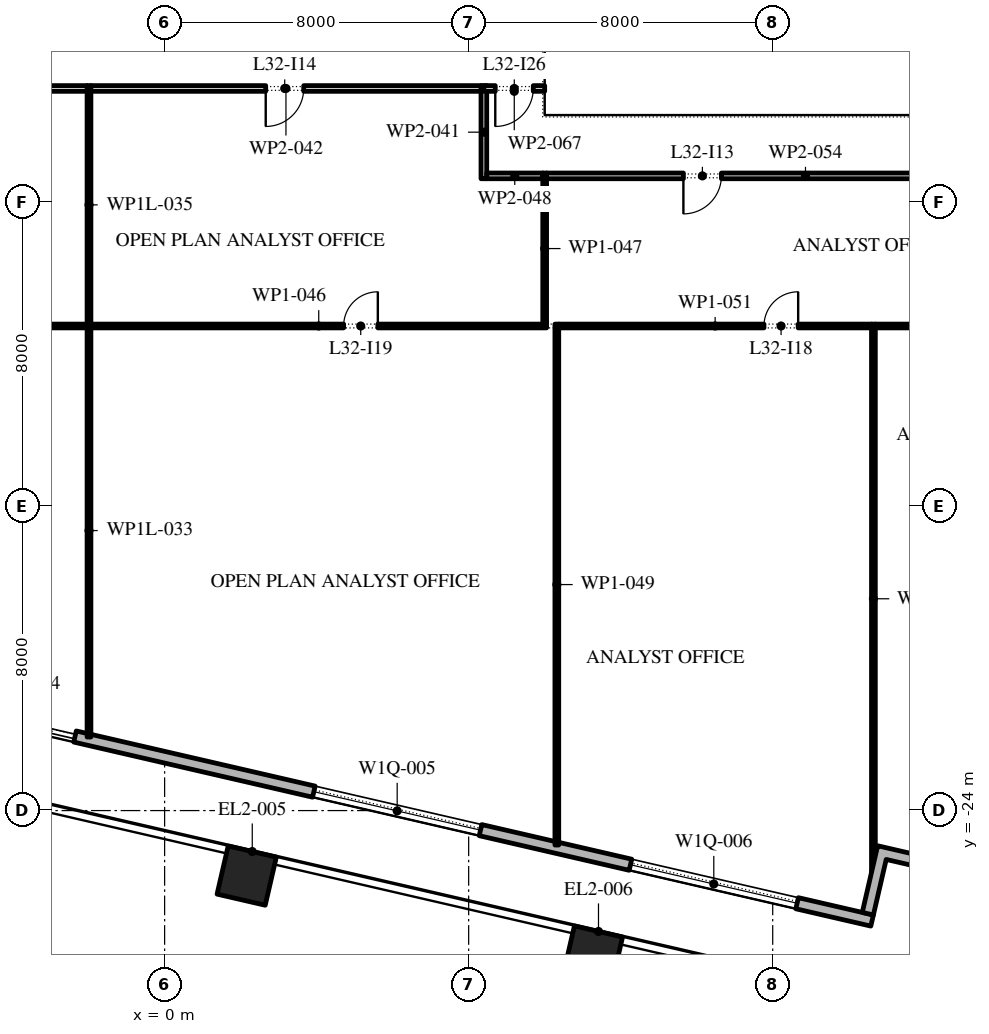
"""IFC4 building model, lengths in metres.
Left out: names, types, materials, properties, quantities, classifications, styles, units other than length and angle.
Written with IfcOpenShell. Run it as: python <this file> out.ifc"""

import sys

from ifc_helpers import new_model, si_unit, direction, frame, frame_2d, origin, origin_2d, place, context, subcontext, project, spatial, polyline, rectangle, outline, extrude, element, fill, save


model = new_model("IFC4")
c1 = context("Model", 3, precision=1e-05, world=origin(), true_north=direction((0.0, 1.0)))
c2 = subcontext(c1, "Body", "Model", "MODEL_VIEW")
j1 = project(units=[si_unit("LENGTHUNIT", "METRE"), si_unit("PLANEANGLEUNIT", "RADIAN")], contexts=[c1])
p1 = place(None, origin())
s1 = spatial("IfcSite", under=j1, at=p1, CompositionType="ELEMENT")
p2 = place(p1, origin())
s2 = spatial("IfcBuilding", under=s1, at=p2, CompositionType="ELEMENT")
p3 = place(p2, frame((0.0, 0.0, 147.6)))
s3 = spatial("IfcBuildingStorey", under=s2, at=p3, CompositionType="ELEMENT", Elevation=147.6)
for number, where, z_axis, x_axis in (
    (1, (2.159, -25.711, 0.0), (0.0, 0.0, 1.0), (0.974, -0.225, 0.0)),
    (2, (11.27, -27.815, 0.0), (0.0, 0.0, 1.0), (0.974, -0.225, 0.0)),
):
    element("IfcColumn", number, at=place(p3, frame(where, z_axis=z_axis, x_axis=x_axis)), inside=s3, PredefinedType="COLUMN", context=c2, shape_type="SweptSolid", body=[
        extrude(rectangle(XDim=1.3, YDim=1.3, at=origin_2d()), origin(), (0.0, 0.0, 1.0), 4.2),
    ])
p4 = place(p3, frame((-31.078, -15.421, 0.0), z_axis=(0.0, 0.0, 1.0), x_axis=(0.974370456532, -0.224949357493, 0.0)))
e3 = element("IfcWall", 3, at=p4, inside=s3, PredefinedType="STANDARD", context=c2, shape_type="SweptSolid", body=[
    extrude(rectangle(XDim=51.0, YDim=0.3, at=frame_2d((25.5, 0.0))), origin(), (0.0, 0.0, 1.0), 4.0),
])
p5 = place(p4, frame((1.875, 0.0, 0.45)))
e4 = element("IfcOpeningElement", 4, at=p5, cuts=e3, PredefinedType="OPENING", context=c2, shape_type="SweptSolid", body=[
    extrude(rectangle(XDim=4.5, YDim=2.65, at=frame_2d((2.25, 1.325))), frame((0.0, 0.16, 0.0), z_axis=(0.0, -1.0, 0.0), x_axis=(1.0, 0.0, 0.0)), (0.0, 0.0, 1.0), 0.32),
])
p6 = place(p4, frame((10.275, 0.0, 0.45)))
e5 = element("IfcOpeningElement", 5, at=p6, cuts=e3, PredefinedType="OPENING", context=c2, shape_type="SweptSolid", body=[
    extrude(rectangle(XDim=4.5, YDim=2.525, at=frame_2d((2.25, 1.262))), frame((0.0, 0.16, 0.0), z_axis=(0.0, -1.0, 0.0), x_axis=(1.0, 0.0, 0.0)), (0.0, 0.0, 1.0), 0.32),
])
p7 = place(p4, frame((18.825, 0.0, 0.45)))
e6 = element("IfcOpeningElement", 6, at=p7, cuts=e3, PredefinedType="OPENING", context=c2, shape_type="SweptSolid", body=[
    extrude(rectangle(XDim=4.5, YDim=2.5, at=frame_2d((2.25, 1.25))), frame((0.0, 0.16, 0.0), z_axis=(0.0, -1.0, 0.0), x_axis=(1.0, 0.0, 0.0)), (0.0, 0.0, 1.0), 0.32),
])
p8 = place(p4, frame((27.075, 0.0, 0.0)))
e7 = element("IfcOpeningElement", 7, at=p8, cuts=e3, PredefinedType="OPENING", context=c2, shape_type="SweptSolid", body=[
    extrude(rectangle(XDim=2.4, YDim=3.5, at=frame_2d((1.2, 1.75))), frame((0.0, 0.16, 0.0), z_axis=(0.0, -1.0, 0.0), x_axis=(1.0, 0.0, 0.0)), (0.0, 0.0, 1.0), 0.32),
])
p9 = place(p4, frame((35.925, 0.0, 0.45)))
e8 = element("IfcOpeningElement", 8, at=p9, cuts=e3, PredefinedType="OPENING", context=c2, shape_type="SweptSolid", body=[
    extrude(rectangle(XDim=4.5, YDim=2.45, at=frame_2d((2.25, 1.225))), frame((0.0, 0.16, 0.0), z_axis=(0.0, -1.0, 0.0), x_axis=(1.0, 0.0, 0.0)), (0.0, 0.0, 1.0), 0.32),
])
p10 = place(p4, frame((44.475, 0.0, 0.45)))
e9 = element("IfcOpeningElement", 9, at=p10, cuts=e3, PredefinedType="OPENING", context=c2, shape_type="SweptSolid", body=[
    extrude(rectangle(XDim=4.5, YDim=2.45, at=frame_2d((2.25, 1.225))), frame((0.0, 0.16, 0.0), z_axis=(0.0, -1.0, 0.0), x_axis=(1.0, 0.0, 0.0)), (0.0, 0.0, 1.0), 0.32),
])
p11 = place(p3, origin())
e10 = element("IfcWall", 10, at=p11, inside=s3, PredefinedType="STANDARD", context=c2, shape_type="SweptSolid", body=[
    extrude(outline(polyline([(20.515, -25.331), (20.92, -23.577), (22.967, -24.049), (22.899, -24.342), (21.145, -23.937), (20.74, -25.691), (18.986, -25.286), (18.649, -26.747), (18.357, -26.68), (18.762, -24.926), (20.515, -25.331)])), origin(), (0.0, 0.0, 1.0), 4.0),
])
p12 = place(p3, frame((-1.99, -22.065, 0.0), z_axis=(0.0, 0.0, 1.0), x_axis=(0.0, 1.0, 0.0)))
e11 = element("IfcWall", 11, at=p12, inside=s3, PredefinedType="PARTITIONING", context=c2, shape_type="SweptSolid", body=[
    extrude(rectangle(XDim=10.865, YDim=0.1, at=frame_2d((5.433, 0.0))), origin(), (0.0, 0.0, 1.0), 3.02),
])
p13 = place(p3, frame((-2.04, -11.25, 0.0), z_axis=(0.0, 0.0, 1.0), x_axis=(-1.0, 0.0, 0.0)))
e12 = element("IfcWall", 12, at=p13, inside=s3, PredefinedType="PARTITIONING", context=c2, shape_type="SweptSolid", body=[
    extrude(rectangle(XDim=8.23, YDim=0.1, at=frame_2d((4.115, 0.0))), origin(), (0.0, 0.0, 1.0), 4.0),
])
p14 = place(p13, frame((5.43, 0.0, 0.0)))
e13 = element("IfcOpeningElement", 13, at=p14, cuts=e12, PredefinedType="OPENING", context=c2, shape_type="SweptSolid", body=[
    extrude(rectangle(XDim=0.9, YDim=2.1, at=frame_2d((0.45, 1.05))), frame((0.0, 0.06, 0.0), z_axis=(0.0, -1.0, 0.0), x_axis=(1.0, 0.0, 0.0)), (0.0, 0.0, 1.0), 0.12),
])
p15 = place(p3, frame((-1.99, -11.2, 0.0), z_axis=(0.0, 0.0, 1.0), x_axis=(0.0, 1.0, 0.0)))
e14 = element("IfcWall", 14, at=p15, inside=s3, PredefinedType="PARTITIONING", context=c2, shape_type="SweptSolid", body=[
    extrude(rectangle(XDim=6.275, YDim=0.1, at=frame_2d((3.137, 0.0))), origin(), (0.0, 0.0, 1.0), 3.02),
])
p16 = place(p3, frame((-2.04, -5.0, 0.0), z_axis=(0.0, 0.0, 1.0), x_axis=(-1.0, 0.0, 0.0)))
e15 = element("IfcWall", 15, at=p16, inside=s3, PredefinedType="PARTITIONING", context=c2, shape_type="SweptSolid", body=[
    extrude(rectangle(XDim=6.285, YDim=0.15, at=frame_2d((3.143, 0.0))), origin(), (0.0, 0.0, 1.0), 4.0),
])
p17 = place(p3, frame((8.4, -7.375, 0.0), z_axis=(0.0, 0.0, 1.0), x_axis=(0.0, 1.0, 0.0)))
e16 = element("IfcWall", 16, at=p17, inside=s3, PredefinedType="PARTITIONING", context=c2, shape_type="SweptSolid", body=[
    extrude(rectangle(XDim=2.45, YDim=0.15, at=frame_2d((1.225, 0.0))), origin(), (0.0, 0.0, 1.0), 4.0),
])
p18 = place(p3, frame((8.325, -5.0, 0.0), z_axis=(0.0, 0.0, 1.0), x_axis=(-1.0, 0.0, 0.0)))
e17 = element("IfcWall", 17, at=p18, inside=s3, PredefinedType="PARTITIONING", context=c2, shape_type="SweptSolid", body=[
    extrude(rectangle(XDim=10.265, YDim=0.15, at=frame_2d((5.132, 0.0))), origin(), (0.0, 0.0, 1.0), 4.0),
])
p19 = place(p18, frame((4.665, 0.0, 0.0)))
e18 = element("IfcOpeningElement", 18, at=p19, cuts=e17, PredefinedType="OPENING", context=c2, shape_type="SweptSolid", body=[
    extrude(rectangle(XDim=1.0, YDim=2.1, at=frame_2d((0.5, 1.05))), frame((0.0, 0.085, 0.0), z_axis=(0.0, -1.0, 0.0), x_axis=(1.0, 0.0, 0.0)), (0.0, 0.0, 1.0), 0.17),
])
p20 = place(p3, frame((10.05, -11.25, 0.0), z_axis=(0.0, 0.0, 1.0), x_axis=(-1.0, 0.0, 0.0)))
e19 = element("IfcWall", 19, at=p20, inside=s3, PredefinedType="PARTITIONING", context=c2, shape_type="SweptSolid", body=[
    extrude(rectangle(XDim=11.99, YDim=0.1, at=frame_2d((5.995, 0.0))), origin(), (0.0, 0.0, 1.0), 4.0),
])
p21 = place(p20, frame((4.44, 0.0, 0.0)))
e20 = element("IfcOpeningElement", 20, at=p21, cuts=e19, PredefinedType="OPENING", context=c2, shape_type="SweptSolid", body=[
    extrude(rectangle(XDim=0.9, YDim=2.1, at=frame_2d((0.45, 1.05))), frame((0.0, 0.06, 0.0), z_axis=(0.0, -1.0, 0.0), x_axis=(1.0, 0.0, 0.0)), (0.0, 0.0, 1.0), 0.12),
])
p22 = place(p3, frame((10.0, -11.2, 0.0), z_axis=(0.0, 0.0, 1.0), x_axis=(0.0, 1.0, 0.0)))
e21 = element("IfcWall", 21, at=p22, inside=s3, PredefinedType="PARTITIONING", context=c2, shape_type="SweptSolid", body=[
    extrude(rectangle(XDim=3.975, YDim=0.1, at=frame_2d((1.987, 0.0))), origin(), (0.0, 0.0, 1.0), 4.0),
])
p23 = place(p3, frame((9.95, -7.3, 0.0), z_axis=(0.0, 0.0, 1.0), x_axis=(-1.0, 0.0, 0.0)))
e22 = element("IfcWall", 22, at=p23, inside=s3, PredefinedType="PARTITIONING", context=c2, shape_type="SweptSolid", body=[
    extrude(rectangle(XDim=1.475, YDim=0.15, at=frame_2d((0.737, 0.0))), origin(), (0.0, 0.0, 1.0), 4.0),
])
p24 = place(p3, frame((10.32, -24.907, 0.0), z_axis=(0.0, 0.0, 1.0), x_axis=(0.0, 1.0, 0.0)))
e23 = element("IfcWall", 23, at=p24, inside=s3, PredefinedType="PARTITIONING", context=c2, shape_type="SweptSolid", body=[
    extrude(rectangle(XDim=13.707, YDim=0.1, at=frame_2d((6.854, 0.0))), origin(), (0.0, 0.0, 1.0), 4.0),
])
p25 = place(p3, frame((18.65, -25.654, 0.0), z_axis=(0.0, 0.0, 1.0), x_axis=(0.0, 1.0, 0.0)))
e24 = element("IfcWall", 24, at=p25, inside=s3, PredefinedType="PARTITIONING", context=c2, shape_type="SweptSolid", body=[
    extrude(rectangle(XDim=14.454, YDim=0.1, at=frame_2d((7.227, 0.0))), origin(), (0.0, 0.0, 1.0), 4.0),
])
p26 = place(p3, frame((18.6, -11.25, 0.0), z_axis=(0.0, 0.0, 1.0), x_axis=(-1.0, 0.0, 0.0)))
e25 = element("IfcWall", 25, at=p26, inside=s3, PredefinedType="PARTITIONING", context=c2, shape_type="SweptSolid", body=[
    extrude(rectangle(XDim=8.23, YDim=0.1, at=frame_2d((4.115, 0.0))), origin(), (0.0, 0.0, 1.0), 4.0),
])
p27 = place(p26, frame((1.93, 0.0, 0.0)))
e26 = element("IfcOpeningElement", 26, at=p27, cuts=e25, PredefinedType="OPENING", context=c2, shape_type="SweptSolid", body=[
    extrude(rectangle(XDim=0.9, YDim=2.1, at=frame_2d((0.45, 1.05))), frame((0.0, 0.06, 0.0), z_axis=(0.0, -1.0, 0.0), x_axis=(1.0, 0.0, 0.0)), (0.0, 0.0, 1.0), 0.12),
])
p28 = place(p3, frame((23.675, -7.3, 0.0), z_axis=(0.0, 0.0, 1.0), x_axis=(-1.0, 0.0, 0.0)))
e27 = element("IfcWall", 27, at=p28, inside=s3, PredefinedType="PARTITIONING", context=c2, shape_type="SweptSolid", body=[
    extrude(rectangle(XDim=13.625, YDim=0.15, at=frame_2d((6.812, 0.0))), origin(), (0.0, 0.0, 1.0), 4.0),
])
p29 = place(p28, frame((9.025, 0.0, 0.0)))
e28 = element("IfcOpeningElement", 28, at=p29, cuts=e27, PredefinedType="OPENING", context=c2, shape_type="SweptSolid", body=[
    extrude(rectangle(XDim=1.0, YDim=2.1, at=frame_2d((0.5, 1.05))), frame((0.0, 0.085, 0.0), z_axis=(0.0, -1.0, 0.0), x_axis=(1.0, 0.0, 0.0)), (0.0, 0.0, 1.0), 0.17),
])
p30 = place(p3, frame((25.696, -11.25, 0.0), z_axis=(0.0, 0.0, 1.0), x_axis=(-1.0, 0.0, 0.0)))
e29 = element("IfcWall", 29, at=p30, inside=s3, PredefinedType="PARTITIONING", context=c2, shape_type="SweptSolid", body=[
    extrude(rectangle(XDim=6.996, YDim=0.1, at=frame_2d((3.498, 0.0))), origin(), (0.0, 0.0, 1.0), 4.0),
])
p31 = place(p30, frame((4.446, 0.0, 0.0)))
e30 = element("IfcOpeningElement", 30, at=p31, cuts=e29, PredefinedType="OPENING", context=c2, shape_type="SweptSolid", body=[
    extrude(rectangle(XDim=0.9, YDim=2.1, at=frame_2d((0.45, 1.05))), frame((0.0, 0.06, 0.0), z_axis=(0.0, -1.0, 0.0), x_axis=(1.0, 0.0, 0.0)), (0.0, 0.0, 1.0), 0.12),
])
p32 = place(p3, frame((10.0, -5.0, 0.0), z_axis=(0.0, 0.0, 1.0), x_axis=(-1.0, 0.0, 0.0)))
e31 = element("IfcWall", 31, at=p32, inside=s3, PredefinedType="PARTITIONING", context=c2, shape_type="SweptSolid", body=[
    extrude(rectangle(XDim=1.6, YDim=0.15, at=frame_2d((0.8, 0.0))), origin(), (0.0, 0.0, 1.0), 4.0),
])
p33 = place(p32, frame((0.3, 0.0, 0.0)))
e32 = element("IfcOpeningElement", 32, at=p33, cuts=e31, PredefinedType="OPENING", context=c2, shape_type="SweptSolid", body=[
    extrude(rectangle(XDim=1.0, YDim=2.1, at=frame_2d((0.5, 1.05))), frame((0.0, 0.085, 0.0), z_axis=(0.0, -1.0, 0.0), x_axis=(1.0, 0.0, 0.0)), (0.0, 0.0, 1.0), 0.17),
])
p34 = place(p8, origin())
e33 = element("IfcDoor", 33, at=p34, inside=s3, OperationType="DOUBLE_DOOR_SLIDING", PredefinedType="DOOR", context=c2, shape_type="SweptSolid", body=[
    extrude(rectangle(XDim=2.4, YDim=3.5, at=frame_2d((1.2, 1.75))), frame((0.0, 0.025, 0.0), z_axis=(0.0, -1.0, 0.0), x_axis=(1.0, 0.0, 0.0)), (0.0, 0.0, 1.0), 0.05),
])
fill(e7, e33)
p35 = place(p9, origin())
e34 = element("IfcWindow", 34, at=p35, inside=s3, PartitioningType="DOUBLE_PANEL_VERTICAL", PredefinedType="WINDOW", context=c2, shape_type="SweptSolid", body=[
    extrude(rectangle(XDim=4.5, YDim=2.45, at=frame_2d((2.25, 1.225))), frame((0.0, 0.03, 0.0), z_axis=(0.0, -1.0, 0.0), x_axis=(1.0, 0.0, 0.0)), (0.0, 0.0, 1.0), 0.06),
])
fill(e8, e34)
p36 = place(p10, origin())
e35 = element("IfcWindow", 35, at=p36, inside=s3, PartitioningType="DOUBLE_PANEL_VERTICAL", PredefinedType="WINDOW", context=c2, shape_type="SweptSolid", body=[
    extrude(rectangle(XDim=4.5, YDim=2.45, at=frame_2d((2.25, 1.225))), frame((0.0, 0.03, 0.0), z_axis=(0.0, -1.0, 0.0), x_axis=(1.0, 0.0, 0.0)), (0.0, 0.0, 1.0), 0.06),
])
fill(e9, e35)
p37 = place(p29, origin())
e36 = element("IfcDoor", 36, at=p37, inside=s3, OperationType="SINGLE_SWING_LEFT", PredefinedType="DOOR", context=c2, shape_type="SweptSolid", body=[
    extrude(rectangle(XDim=1.0, YDim=2.1, at=frame_2d((0.5, 1.05))), frame((0.0, 0.025, 0.0), z_axis=(0.0, -1.0, 0.0), x_axis=(1.0, 0.0, 0.0)), (0.0, 0.0, 1.0), 0.05),
])
fill(e28, e36)
p38 = place(p19, origin())
e37 = element("IfcDoor", 37, at=p38, inside=s3, OperationType="SINGLE_SWING_LEFT", PredefinedType="DOOR", context=c2, shape_type="SweptSolid", body=[
    extrude(rectangle(XDim=1.0, YDim=2.1, at=frame_2d((0.5, 1.05))), frame((0.0, 0.025, 0.0), z_axis=(0.0, -1.0, 0.0), x_axis=(1.0, 0.0, 0.0)), (0.0, 0.0, 1.0), 0.05),
])
fill(e18, e37)
p39 = place(p27, frame((0.9, 0.0, 0.0), z_axis=(0.0, 0.0, 1.0), x_axis=(-1.0, 0.0, 0.0)))
e38 = element("IfcDoor", 38, at=p39, inside=s3, OperationType="SINGLE_SWING_LEFT", PredefinedType="DOOR", context=c2, shape_type="SweptSolid", body=[
    extrude(rectangle(XDim=0.9, YDim=2.1, at=frame_2d((0.45, 1.05))), frame((0.0, 0.025, 0.0), z_axis=(0.0, -1.0, 0.0), x_axis=(1.0, 0.0, 0.0)), (0.0, 0.0, 1.0), 0.05),
])
fill(e26, e38)
p40 = place(p21, frame((0.9, 0.0, 0.0), z_axis=(0.0, 0.0, 1.0), x_axis=(-1.0, 0.0, 0.0)))
e39 = element("IfcDoor", 39, at=p40, inside=s3, OperationType="SINGLE_SWING_LEFT", PredefinedType="DOOR", context=c2, shape_type="SweptSolid", body=[
    extrude(rectangle(XDim=0.9, YDim=2.1, at=frame_2d((0.45, 1.05))), frame((0.0, 0.025, 0.0), z_axis=(0.0, -1.0, 0.0), x_axis=(1.0, 0.0, 0.0)), (0.0, 0.0, 1.0), 0.05),
])
fill(e20, e39)
p41 = place(p33, origin())
e40 = element("IfcDoor", 40, at=p41, inside=s3, OperationType="SINGLE_SWING_LEFT", PredefinedType="DOOR", context=c2, shape_type="SweptSolid", body=[
    extrude(rectangle(XDim=1.0, YDim=2.1, at=frame_2d((0.5, 1.05))), frame((0.0, 0.025, 0.0), z_axis=(0.0, -1.0, 0.0), x_axis=(1.0, 0.0, 0.0)), (0.0, 0.0, 1.0), 0.05),
])
fill(e32, e40)
save(model, sys.argv[1])
